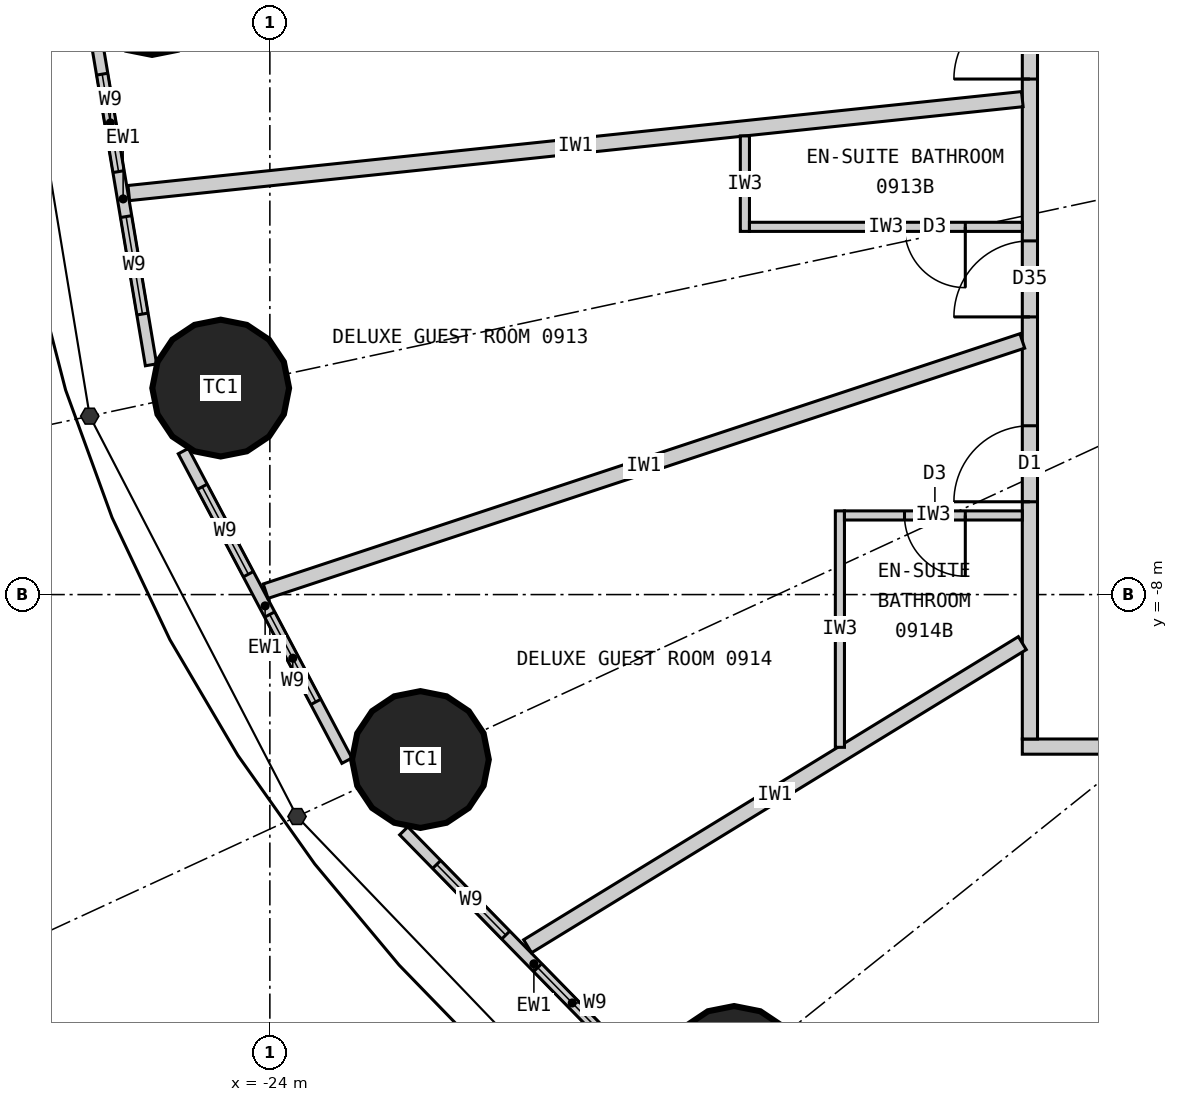
"""IFC4 building model, lengths in metres.
Left out: names, types, materials, properties, quantities, classifications, styles, units other than length and angle.
Written with IfcOpenShell. Run it as: python <this file> out.ifc"""

import sys

from ifc_helpers import new_model, si_unit, direction, frame, frame_2d, origin, origin_2d, place, context, subcontext, project, spatial, rectangle, circle, extrude, element, fill, save


model = new_model("IFC4")
c1 = context("Model", 3, precision=1e-05, world=origin(), true_north=direction((0.0, 1.0)))
c2 = subcontext(c1, "Body", "Model", "MODEL_VIEW")
j1 = project(units=[si_unit("LENGTHUNIT", "METRE"), si_unit("PLANEANGLEUNIT", "RADIAN")], contexts=[c1])
p1 = place(None, origin())
s1 = spatial("IfcSite", under=j1, at=p1, CompositionType="ELEMENT")
p2 = place(p1, origin())
s2 = spatial("IfcBuilding", under=s1, at=p2, CompositionType="ELEMENT")
p3 = place(p2, frame((0.0, 0.0, 42.6)))
s3 = spatial("IfcBuildingStorey", under=s2, at=p3, CompositionType="ELEMENT", Elevation=42.6)
for number, where, z_axis, x_axis in (
    (1, (-25.55, 0.0, 0.0), (0.0, 0.0, 1.0), (1.0, 0.0, 0.0)),
    (2, (-24.647, -5.283, 0.0), (0.0, 0.0, 1.0), (1.0, 0.0, 0.0)),
    (3, (-22.019, -10.17, 0.0), (0.0, 0.0, 1.0), (1.0, 0.0, 0.0)),
    (4, (-17.892, -14.313, 0.0), (0.0, 0.0, 1.0), (1.0, 0.0, 0.0)),
):
    element("IfcColumn", number, at=place(p3, frame(where, z_axis=z_axis, x_axis=x_axis)), inside=s3, PredefinedType="COLUMN", context=c2, shape_type="SweptSolid", body=[
        extrude(circle(Radius=0.9, at=origin_2d()), origin(), (0.0, 0.0, 1.0), 3.3),
    ])
p4 = place(p3, frame((-26.297, -0.611, 0.0), z_axis=(0.0, 0.0, 1.0), x_axis=(0.165641751141, -0.986185991727, 0.0)))
e5 = element("IfcWall", 5, at=p4, inside=s3, PredefinedType="ELEMENTEDWALL", context=c2, shape_type="SweptSolid", body=[
    extrude(rectangle(XDim=4.428, YDim=0.15, at=frame_2d((2.214, 0.0))), origin(), (0.0, 0.0, 1.0), 3.05),
])
p5 = place(p4, frame((0.55, 0.0, 0.9)))
e6 = element("IfcOpeningElement", 6, at=p5, cuts=e5, PredefinedType="OPENING", context=c2, shape_type="SweptSolid", body=[
    extrude(rectangle(XDim=1.3, YDim=1.9, at=frame_2d((0.65, 0.95))), frame((0.0, 0.085, 0.0), z_axis=(0.0, -1.0, 0.0), x_axis=(1.0, 0.0, 0.0)), (0.0, 0.0, 1.0), 0.17),
])
p6 = place(p4, frame((2.45, 0.0, 0.9)))
e7 = element("IfcOpeningElement", 7, at=p6, cuts=e5, PredefinedType="OPENING", context=c2, shape_type="SweptSolid", body=[
    extrude(rectangle(XDim=1.3, YDim=1.9, at=frame_2d((0.65, 0.95))), frame((0.0, 0.085, 0.0), z_axis=(0.0, -1.0, 0.0), x_axis=(1.0, 0.0, 0.0)), (0.0, 0.0, 1.0), 0.17),
])
p7 = place(p3, frame((-25.139, -6.113, 0.0), z_axis=(0.0, 0.0, 1.0), x_axis=(0.467303182954, -0.884097129959, 0.0)))
e8 = element("IfcWall", 8, at=p7, inside=s3, PredefinedType="ELEMENTEDWALL", context=c2, shape_type="SweptSolid", body=[
    extrude(rectangle(XDim=4.606, YDim=0.15, at=frame_2d((2.303, 0.0))), origin(), (0.0, 0.0, 1.0), 3.05),
])
p8 = place(p7, frame((0.531, 0.0, 0.9)))
e9 = element("IfcOpeningElement", 9, at=p8, cuts=e8, PredefinedType="OPENING", context=c2, shape_type="SweptSolid", body=[
    extrude(rectangle(XDim=1.3, YDim=1.9, at=frame_2d((0.65, 0.95))), frame((0.0, 0.085, 0.0), z_axis=(0.0, -1.0, 0.0), x_axis=(1.0, 0.0, 0.0)), (0.0, 0.0, 1.0), 0.17),
])
p9 = place(p7, frame((2.432, 0.0, 0.9)))
e10 = element("IfcOpeningElement", 10, at=p9, cuts=e8, PredefinedType="OPENING", context=c2, shape_type="SweptSolid", body=[
    extrude(rectangle(XDim=1.3, YDim=1.9, at=frame_2d((0.65, 0.95))), frame((0.0, 0.085, 0.0), z_axis=(0.0, -1.0, 0.0), x_axis=(1.0, 0.0, 0.0)), (0.0, 0.0, 1.0), 0.17),
])
p10 = place(p3, frame((-22.239, -11.108, 0.0), z_axis=(0.0, 0.0, 1.0), x_axis=(0.699612594083, -0.714522370679, 0.0)))
e11 = element("IfcWall", 11, at=p10, inside=s3, PredefinedType="ELEMENTEDWALL", context=c2, shape_type="SweptSolid", body=[
    extrude(rectangle(XDim=4.896, YDim=0.15, at=frame_2d((2.448, 0.0))), origin(), (0.0, 0.0, 1.0), 3.05),
])
p11 = place(p10, frame((0.619, 0.0, 0.9)))
e12 = element("IfcOpeningElement", 12, at=p11, cuts=e11, PredefinedType="OPENING", context=c2, shape_type="SweptSolid", body=[
    extrude(rectangle(XDim=1.3, YDim=1.9, at=frame_2d((0.65, 0.95))), frame((0.0, 0.085, 0.0), z_axis=(0.0, -1.0, 0.0), x_axis=(1.0, 0.0, 0.0)), (0.0, 0.0, 1.0), 0.17),
])
p12 = place(p10, frame((2.519, 0.0, 0.9)))
e13 = element("IfcOpeningElement", 13, at=p12, cuts=e11, PredefinedType="OPENING", context=c2, shape_type="SweptSolid", body=[
    extrude(rectangle(XDim=1.3, YDim=1.9, at=frame_2d((0.65, 0.95))), frame((0.0, 0.085, 0.0), z_axis=(0.0, -1.0, 0.0), x_axis=(1.0, 0.0, 0.0)), (0.0, 0.0, 1.0), 0.17),
])
p13 = place(p3, frame((14.1, -10.0, 0.0), z_axis=(0.0, 0.0, 1.0), x_axis=(-1.0, 0.0, 0.0)))
e14 = element("IfcWall", 14, at=p13, inside=s3, PredefinedType="PARTITIONING", context=c2, shape_type="SweptSolid", body=[
    extrude(rectangle(XDim=28.2, YDim=0.2, at=frame_2d((14.1, 0.0))), origin(), (0.0, 0.0, 1.0), 3.05),
])
p14 = place(p13, frame((21.948, 0.0, 0.0)))
e15 = element("IfcOpeningElement", 15, at=p14, cuts=e14, PredefinedType="OPENING", context=c2, shape_type="SweptSolid", body=[
    extrude(rectangle(XDim=1.0, YDim=2.2, at=frame_2d((0.5, 1.1))), frame((0.0, 0.11, 0.0), z_axis=(0.0, -1.0, 0.0), x_axis=(1.0, 0.0, 0.0)), (0.0, 0.0, 1.0), 0.22),
])
p15 = place(p13, frame((15.684, 0.0, 0.0)))
e16 = element("IfcOpeningElement", 16, at=p15, cuts=e14, PredefinedType="OPENING", context=c2, shape_type="SweptSolid", body=[
    extrude(rectangle(XDim=1.0, YDim=2.2, at=frame_2d((0.5, 1.1))), frame((0.0, 0.11, 0.0), z_axis=(0.0, -1.0, 0.0), x_axis=(1.0, 0.0, 0.0)), (0.0, 0.0, 1.0), 0.22),
])
p16 = place(p13, frame((8.875, 0.0, 0.0)))
e17 = element("IfcOpeningElement", 17, at=p16, cuts=e14, PredefinedType="OPENING", context=c2, shape_type="SweptSolid", body=[
    extrude(rectangle(XDim=1.0, YDim=2.2, at=frame_2d((0.5, 1.1))), frame((0.0, 0.11, 0.0), z_axis=(0.0, -1.0, 0.0), x_axis=(1.0, 0.0, 0.0)), (0.0, 0.0, 1.0), 0.22),
])
p17 = place(p3, frame((-14.0, 9.9, 0.0), z_axis=(0.0, 0.0, 1.0), x_axis=(0.0, -1.0, 0.0)))
e18 = element("IfcWall", 18, at=p17, inside=s3, PredefinedType="PARTITIONING", context=c2, shape_type="SweptSolid", body=[
    extrude(rectangle(XDim=19.8, YDim=0.2, at=frame_2d((9.9, 0.0))), origin(), (0.0, 0.0, 1.0), 3.05),
])
p18 = place(p17, frame((0.103, 0.0, 0.0)))
e19 = element("IfcOpeningElement", 19, at=p18, cuts=e18, PredefinedType="OPENING", context=c2, shape_type="SweptSolid", body=[
    extrude(rectangle(XDim=1.0, YDim=2.2, at=frame_2d((0.5, 1.1))), frame((0.0, 0.11, 0.0), z_axis=(0.0, -1.0, 0.0), x_axis=(1.0, 0.0, 0.0)), (0.0, 0.0, 1.0), 0.22),
])
p19 = place(p17, frame((5.252, 0.0, 0.0)))
e20 = element("IfcOpeningElement", 20, at=p19, cuts=e18, PredefinedType="OPENING", context=c2, shape_type="SweptSolid", body=[
    extrude(rectangle(XDim=1.0, YDim=2.0, at=frame_2d((0.5, 1.0))), frame((0.0, 0.11, 0.0), z_axis=(0.0, -1.0, 0.0), x_axis=(1.0, 0.0, 0.0)), (0.0, 0.0, 1.0), 0.22),
])
p20 = place(p17, frame((10.117, 0.0, 0.0)))
e21 = element("IfcOpeningElement", 21, at=p20, cuts=e18, PredefinedType="OPENING", context=c2, shape_type="SweptSolid", body=[
    extrude(rectangle(XDim=1.0, YDim=2.2, at=frame_2d((0.5, 1.1))), frame((0.0, 0.11, 0.0), z_axis=(0.0, -1.0, 0.0), x_axis=(1.0, 0.0, 0.0)), (0.0, 0.0, 1.0), 0.22),
])
p21 = place(p17, frame((13.247, 0.0, 0.0)))
e22 = element("IfcOpeningElement", 22, at=p21, cuts=e18, PredefinedType="OPENING", context=c2, shape_type="SweptSolid", body=[
    extrude(rectangle(XDim=1.0, YDim=2.0, at=frame_2d((0.5, 1.0))), frame((0.0, 0.11, 0.0), z_axis=(0.0, -1.0, 0.0), x_axis=(1.0, 0.0, 0.0)), (0.0, 0.0, 1.0), 0.22),
])
p22 = place(p17, frame((15.679, 0.0, 0.0)))
e23 = element("IfcOpeningElement", 23, at=p22, cuts=e18, PredefinedType="OPENING", context=c2, shape_type="SweptSolid", body=[
    extrude(rectangle(XDim=1.0, YDim=2.2, at=frame_2d((0.5, 1.1))), frame((0.0, 0.11, 0.0), z_axis=(0.0, -1.0, 0.0), x_axis=(1.0, 0.0, 0.0)), (0.0, 0.0, 1.0), 0.22),
])
p23 = place(p3, frame((-14.1, -1.482, 0.0), z_axis=(0.0, 0.0, 1.0), x_axis=(-0.994522076235, -0.104526742422, 0.0)))
e24 = element("IfcWall", 24, at=p23, inside=s3, PredefinedType="PARTITIONING", context=c2, shape_type="SweptSolid", body=[
    extrude(rectangle(XDim=11.821, YDim=0.2, at=frame_2d((5.91, 0.0))), origin(), (0.0, 0.0, 1.0), 2.2),
])
p24 = place(p3, frame((-14.1, -4.663, 0.0), z_axis=(0.0, 0.0, 1.0), x_axis=(-0.949432655039, -0.31397075269, 0.0)))
e25 = element("IfcWall", 25, at=p24, inside=s3, PredefinedType="PARTITIONING", context=c2, shape_type="SweptSolid", body=[
    extrude(rectangle(XDim=10.486, YDim=0.2, at=frame_2d((5.243, 0.0))), origin(), (0.0, 0.0, 1.0), 3.05),
])
p25 = place(p3, frame((-14.1, -8.639, 0.0), z_axis=(0.0, 0.0, 1.0), x_axis=(-0.852672493023, -0.522445805459, 0.0)))
e26 = element("IfcWall", 26, at=p25, inside=s3, PredefinedType="PARTITIONING", context=c2, shape_type="SweptSolid", body=[
    extrude(rectangle(XDim=7.633, YDim=0.2, at=frame_2d((3.817, 0.0))), origin(), (0.0, 0.0, 1.0), 3.05),
])
p26 = place(p3, frame((-17.75, -1.966, 0.0), z_axis=(0.0, 0.0, 1.0), x_axis=(0.0, -1.0, 0.0)))
e27 = element("IfcWall", 27, at=p26, inside=s3, PredefinedType="PARTITIONING", context=c2, shape_type="SweptSolid", body=[
    extrude(rectangle(XDim=1.256, YDim=0.12, at=frame_2d((0.628, 0.0))), origin(), (0.0, 0.0, 1.0), 3.05),
])
p27 = place(p3, frame((-14.1, -3.162, 0.0), z_axis=(0.0, 0.0, 1.0), x_axis=(-1.0, 0.0, 0.0)))
e28 = element("IfcWall", 28, at=p27, inside=s3, PredefinedType="PARTITIONING", context=c2, shape_type="SweptSolid", body=[
    extrude(rectangle(XDim=3.59, YDim=0.12, at=frame_2d((1.795, 0.0))), origin(), (0.0, 0.0, 1.0), 3.05),
])
p28 = place(p27, frame((0.75, 0.0, 0.0)))
e29 = element("IfcOpeningElement", 29, at=p28, cuts=e28, PredefinedType="OPENING", context=c2, shape_type="SweptSolid", body=[
    extrude(rectangle(XDim=0.8, YDim=2.1, at=frame_2d((0.4, 1.05))), frame((0.0, 0.07, 0.0), z_axis=(0.0, -1.0, 0.0), x_axis=(1.0, 0.0, 0.0)), (0.0, 0.0, 1.0), 0.14),
])
p29 = place(p3, frame((-16.5, -10.01, 0.0), z_axis=(0.0, 0.0, 1.0), x_axis=(0.0, 1.0, 0.0)))
e30 = element("IfcWall", 30, at=p29, inside=s3, PredefinedType="PARTITIONING", context=c2, shape_type="SweptSolid", body=[
    extrude(rectangle(XDim=3.111, YDim=0.12, at=frame_2d((1.555, 0.0))), origin(), (0.0, 0.0, 1.0), 3.05),
])
p30 = place(p3, frame((-14.1, -6.959, 0.0), z_axis=(0.0, 0.0, 1.0), x_axis=(-1.0, 0.0, 0.0)))
e31 = element("IfcWall", 31, at=p30, inside=s3, PredefinedType="PARTITIONING", context=c2, shape_type="SweptSolid", body=[
    extrude(rectangle(XDim=2.34, YDim=0.12, at=frame_2d((1.17, 0.0))), origin(), (0.0, 0.0, 1.0), 3.05),
])
p31 = place(p30, frame((0.75, 0.0, 0.0)))
e32 = element("IfcOpeningElement", 32, at=p31, cuts=e31, PredefinedType="OPENING", context=c2, shape_type="SweptSolid", body=[
    extrude(rectangle(XDim=0.8, YDim=2.1, at=frame_2d((0.4, 1.05))), frame((0.0, 0.07, 0.0), z_axis=(0.0, -1.0, 0.0), x_axis=(1.0, 0.0, 0.0)), (0.0, 0.0, 1.0), 0.14),
])
p32 = place(p5, origin())
e33 = element("IfcWindow", 33, at=p32, inside=s3, PartitioningType="SINGLE_PANEL", PredefinedType="WINDOW", context=c2, shape_type="SweptSolid", body=[
    extrude(rectangle(XDim=1.3, YDim=1.9, at=frame_2d((0.65, 0.95))), frame((0.0, 0.03, 0.0), z_axis=(0.0, -1.0, 0.0), x_axis=(1.0, 0.0, 0.0)), (0.0, 0.0, 1.0), 0.06),
])
fill(e6, e33)
p33 = place(p6, origin())
e34 = element("IfcWindow", 34, at=p33, inside=s3, PartitioningType="SINGLE_PANEL", PredefinedType="WINDOW", context=c2, shape_type="SweptSolid", body=[
    extrude(rectangle(XDim=1.3, YDim=1.9, at=frame_2d((0.65, 0.95))), frame((0.0, 0.03, 0.0), z_axis=(0.0, -1.0, 0.0), x_axis=(1.0, 0.0, 0.0)), (0.0, 0.0, 1.0), 0.06),
])
fill(e7, e34)
p34 = place(p8, origin())
e35 = element("IfcWindow", 35, at=p34, inside=s3, PartitioningType="SINGLE_PANEL", PredefinedType="WINDOW", context=c2, shape_type="SweptSolid", body=[
    extrude(rectangle(XDim=1.3, YDim=1.9, at=frame_2d((0.65, 0.95))), frame((0.0, 0.03, 0.0), z_axis=(0.0, -1.0, 0.0), x_axis=(1.0, 0.0, 0.0)), (0.0, 0.0, 1.0), 0.06),
])
fill(e9, e35)
p35 = place(p9, origin())
e36 = element("IfcWindow", 36, at=p35, inside=s3, PartitioningType="SINGLE_PANEL", PredefinedType="WINDOW", context=c2, shape_type="SweptSolid", body=[
    extrude(rectangle(XDim=1.3, YDim=1.9, at=frame_2d((0.65, 0.95))), frame((0.0, 0.03, 0.0), z_axis=(0.0, -1.0, 0.0), x_axis=(1.0, 0.0, 0.0)), (0.0, 0.0, 1.0), 0.06),
])
fill(e10, e36)
p36 = place(p11, origin())
e37 = element("IfcWindow", 37, at=p36, inside=s3, PartitioningType="SINGLE_PANEL", PredefinedType="WINDOW", context=c2, shape_type="SweptSolid", body=[
    extrude(rectangle(XDim=1.3, YDim=1.9, at=frame_2d((0.65, 0.95))), frame((0.0, 0.03, 0.0), z_axis=(0.0, -1.0, 0.0), x_axis=(1.0, 0.0, 0.0)), (0.0, 0.0, 1.0), 0.06),
])
fill(e12, e37)
p37 = place(p12, origin())
e38 = element("IfcWindow", 38, at=p37, inside=s3, PartitioningType="SINGLE_PANEL", PredefinedType="WINDOW", context=c2, shape_type="SweptSolid", body=[
    extrude(rectangle(XDim=1.3, YDim=1.9, at=frame_2d((0.65, 0.95))), frame((0.0, 0.03, 0.0), z_axis=(0.0, -1.0, 0.0), x_axis=(1.0, 0.0, 0.0)), (0.0, 0.0, 1.0), 0.06),
])
fill(e13, e38)
p38 = place(p20, origin())
e39 = element("IfcDoor", 39, at=p38, inside=s3, OperationType="SINGLE_SWING_RIGHT", PredefinedType="DOOR", context=c2, shape_type="SweptSolid", body=[
    extrude(rectangle(XDim=1.0, YDim=2.2, at=frame_2d((0.5, 1.1))), frame((0.0, 0.025, 0.0), z_axis=(0.0, -1.0, 0.0), x_axis=(1.0, 0.0, 0.0)), (0.0, 0.0, 1.0), 0.05),
])
fill(e21, e39)
p39 = place(p28, origin())
e40 = element("IfcDoor", 40, at=p39, inside=s3, OperationType="SINGLE_SWING_LEFT", PredefinedType="DOOR", context=c2, shape_type="SweptSolid", body=[
    extrude(rectangle(XDim=0.8, YDim=2.1, at=frame_2d((0.4, 1.05))), frame((0.0, 0.025, 0.0), z_axis=(0.0, -1.0, 0.0), x_axis=(1.0, 0.0, 0.0)), (0.0, 0.0, 1.0), 0.05),
])
fill(e29, e40)
p40 = place(p21, origin())
e41 = element("IfcDoor", 41, at=p40, inside=s3, OperationType="SINGLE_SWING_RIGHT", PredefinedType="DOOR", context=c2, shape_type="SweptSolid", body=[
    extrude(rectangle(XDim=1.0, YDim=2.0, at=frame_2d((0.5, 1.0))), frame((0.0, 0.025, 0.0), z_axis=(0.0, -1.0, 0.0), x_axis=(1.0, 0.0, 0.0)), (0.0, 0.0, 1.0), 0.05),
])
fill(e22, e41)
p41 = place(p31, origin())
e42 = element("IfcDoor", 42, at=p41, inside=s3, OperationType="SINGLE_SWING_LEFT", PredefinedType="DOOR", context=c2, shape_type="SweptSolid", body=[
    extrude(rectangle(XDim=0.8, YDim=2.1, at=frame_2d((0.4, 1.05))), frame((0.0, 0.025, 0.0), z_axis=(0.0, -1.0, 0.0), x_axis=(1.0, 0.0, 0.0)), (0.0, 0.0, 1.0), 0.05),
])
fill(e32, e42)
p42 = place(p22, origin())
e43 = element("IfcDoor", 43, at=p42, inside=s3, OperationType="SINGLE_SWING_RIGHT", PredefinedType="DOOR", context=c2, shape_type="SweptSolid", body=[
    extrude(rectangle(XDim=1.0, YDim=2.2, at=frame_2d((0.5, 1.1))), frame((0.0, 0.025, 0.0), z_axis=(0.0, -1.0, 0.0), x_axis=(1.0, 0.0, 0.0)), (0.0, 0.0, 1.0), 0.05),
])
fill(e23, e43)
save(model, sys.argv[1])
